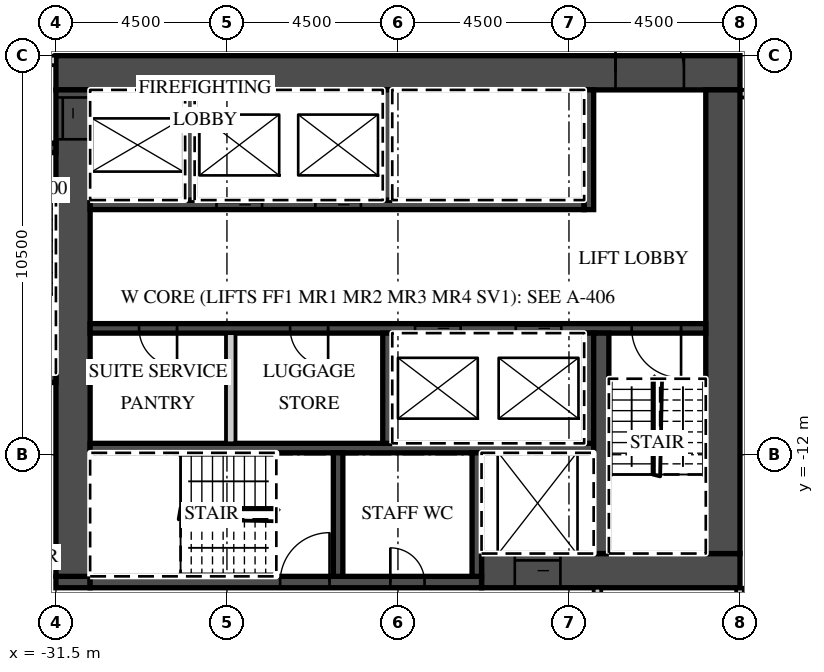
"""IFC4 building model, lengths in metres.
Left out: names, types, materials, properties, quantities, classifications, styles, units other than length and angle.
Written with IfcOpenShell. Run it as: python <this file> out.ifc"""

import sys

from ifc_helpers import new_model, si_unit, direction, frame, frame_2d, origin, place, context, subcontext, project, spatial, rectangle, extrude, element, fill, save


model = new_model("IFC4")
c1 = context("Model", 3, precision=1e-05, world=origin(), true_north=direction((0.0, 1.0)))
c2 = subcontext(c1, "Body", "Model", "MODEL_VIEW")
j1 = project(units=[si_unit("LENGTHUNIT", "METRE"), si_unit("PLANEANGLEUNIT", "RADIAN")], contexts=[c1])
p1 = place(None, origin())
s1 = spatial("IfcSite", under=j1, at=p1, CompositionType="ELEMENT")
p2 = place(p1, origin())
s2 = spatial("IfcBuilding", under=s1, at=p2, CompositionType="ELEMENT")
p3 = place(p2, frame((0.0, 0.0, 173.5)))
s3 = spatial("IfcBuildingStorey", under=s2, at=p3, CompositionType="ELEMENT", Elevation=173.5)
p4 = place(p3, frame((-13.5, -22.3, 0.0), z_axis=(0.0, 0.0, 1.0), x_axis=(0.0, 1.0, 0.0)))
e1 = element("IfcWall", 1, at=p4, inside=s3, PredefinedType="PARTITIONING", context=c2, shape_type="SweptSolid", body=[
    extrude(rectangle(XDim=6.8, YDim=0.2, at=frame_2d((3.4, 0.0))), origin(), (0.0, 0.0, 1.0), 3.02),
])
p5 = place(p3, frame((-13.5, -2.5, 0.0), z_axis=(0.0, 0.0, 1.0), x_axis=(1.0, 0.0, 0.0)))
e2 = element("IfcWall", 2, at=p5, inside=s3, PredefinedType="PARTITIONING", context=c2, shape_type="SweptSolid", body=[
    extrude(rectangle(XDim=27.0, YDim=0.2, at=frame_2d((13.5, 0.0))), origin(), (0.0, 0.0, 1.0), 3.02),
])
p6 = place(p5, frame((0.575, 0.0, 0.0)))
e3 = element("IfcOpeningElement", 3, at=p6, cuts=e2, PredefinedType="OPENING", context=c2, shape_type="SweptSolid", body=[
    extrude(rectangle(XDim=1.0, YDim=2.1, at=frame_2d((0.5, 1.05))), frame((0.0, 0.11, 0.0), z_axis=(0.0, -1.0, 0.0), x_axis=(1.0, 0.0, 0.0)), (0.0, 0.0, 1.0), 0.22),
])
p7 = place(p5, frame((9.863, 0.0, 0.0)))
e4 = element("IfcOpeningElement", 4, at=p7, cuts=e2, PredefinedType="OPENING", context=c2, shape_type="SweptSolid", body=[
    extrude(rectangle(XDim=1.2, YDim=2.1, at=frame_2d((0.6, 1.05))), frame((0.0, 0.11, 0.0), z_axis=(0.0, -1.0, 0.0), x_axis=(1.0, 0.0, 0.0)), (0.0, 0.0, 1.0), 0.22),
])
p8 = place(p5, frame((15.938, 0.0, 0.0)))
e5 = element("IfcOpeningElement", 5, at=p8, cuts=e2, PredefinedType="OPENING", context=c2, shape_type="SweptSolid", body=[
    extrude(rectangle(XDim=1.2, YDim=2.1, at=frame_2d((0.6, 1.05))), frame((0.0, 0.11, 0.0), z_axis=(0.0, -1.0, 0.0), x_axis=(1.0, 0.0, 0.0)), (0.0, 0.0, 1.0), 0.22),
])
p9 = place(p5, frame((23.075, 0.0, 0.0)))
e6 = element("IfcOpeningElement", 6, at=p9, cuts=e2, PredefinedType="OPENING", context=c2, shape_type="SweptSolid", body=[
    extrude(rectangle(XDim=1.0, YDim=2.1, at=frame_2d((0.5, 1.05))), frame((0.0, 0.11, 0.0), z_axis=(0.0, -1.0, 0.0), x_axis=(1.0, 0.0, 0.0)), (0.0, 0.0, 1.0), 0.22),
])
p10 = place(p3, frame((-31.5, -1.95, 0.0), z_axis=(0.0, 0.0, 1.0), x_axis=(1.0, 0.0, 0.0)))
e7 = element("IfcWall", 7, at=p10, inside=s3, PredefinedType="SHEAR", context=c2, shape_type="SweptSolid", body=[
    extrude(rectangle(XDim=18.0, YDim=0.9, at=frame_2d((9.0, 0.0))), origin(), (0.0, 0.0, 1.0), 3.02),
])
p11 = place(p10, frame((14.725, 0.0, 0.0)))
e8 = element("IfcOpeningElement", 8, at=p11, cuts=e7, PredefinedType="OPENING", context=c2, shape_type="SweptSolid", body=[
    extrude(rectangle(XDim=1.8, YDim=2.1, at=frame_2d((0.9, 1.05))), frame((0.0, 0.46, 0.0), z_axis=(0.0, -1.0, 0.0), x_axis=(1.0, 0.0, 0.0)), (0.0, 0.0, 1.0), 0.92),
])
p12 = place(p3, frame((-20.3, -15.05, 0.0), z_axis=(0.0, 0.0, 1.0), x_axis=(1.0, 0.0, 0.0)))
e9 = element("IfcWall", 9, at=p12, inside=s3, PredefinedType="SHEAR", context=c2, shape_type="SweptSolid", body=[
    extrude(rectangle(XDim=6.8, YDim=0.9, at=frame_2d((3.4, 0.0))), origin(), (0.0, 0.0, 1.0), 3.02),
])
p13 = place(p12, frame((0.875, 0.0, 0.0)))
e10 = element("IfcOpeningElement", 10, at=p13, cuts=e9, PredefinedType="OPENING", context=c2, shape_type="SweptSolid", body=[
    extrude(rectangle(XDim=1.2, YDim=2.1, at=frame_2d((0.6, 1.05))), frame((0.0, 0.46, 0.0), z_axis=(0.0, -1.0, 0.0), x_axis=(1.0, 0.0, 0.0)), (0.0, 0.0, 1.0), 0.92),
])
p14 = place(p3, frame((-31.5, -15.35, 0.0), z_axis=(0.0, 0.0, 1.0), x_axis=(1.0, 0.0, 0.0)))
e11 = element("IfcWall", 11, at=p14, inside=s3, PredefinedType="SHEAR", context=c2, shape_type="SweptSolid", body=[
    extrude(rectangle(XDim=0.9, YDim=0.3, at=frame_2d((0.45, 0.0))), origin(), (0.0, 0.0, 1.0), 3.02),
])
p15 = place(p3, frame((-30.6, -15.35, 0.0), z_axis=(0.0, 0.0, 1.0), x_axis=(1.0, 0.0, 0.0)))
e12 = element("IfcWall", 12, at=p15, inside=s3, PredefinedType="SHEAR", context=c2, shape_type="SweptSolid", body=[
    extrude(rectangle(XDim=10.3, YDim=0.3, at=frame_2d((5.15, 0.0))), origin(), (0.0, 0.0, 1.0), 3.02),
])
p16 = place(p15, frame((5.0, 0.0, 0.0)))
e13 = element("IfcOpeningElement", 13, at=p16, cuts=e12, PredefinedType="OPENING", context=c2, shape_type="SweptSolid", body=[
    extrude(rectangle(XDim=1.3, YDim=2.1, at=frame_2d((0.65, 1.05))), frame((0.0, 0.16, 0.0), z_axis=(0.0, -1.0, 0.0), x_axis=(1.0, 0.0, 0.0)), (0.0, 0.0, 1.0), 0.32),
])
p17 = place(p15, frame((7.9, 0.0, 0.0)))
e14 = element("IfcOpeningElement", 14, at=p17, cuts=e12, PredefinedType="OPENING", context=c2, shape_type="SweptSolid", body=[
    extrude(rectangle(XDim=0.9, YDim=2.1, at=frame_2d((0.45, 1.05))), frame((0.0, 0.16, 0.0), z_axis=(0.0, -1.0, 0.0), x_axis=(1.0, 0.0, 0.0)), (0.0, 0.0, 1.0), 0.32),
])
p18 = place(p3, frame((-31.05, -15.2, 0.0), z_axis=(0.0, 0.0, 1.0), x_axis=(0.0, 1.0, 0.0)))
e15 = element("IfcWall", 15, at=p18, inside=s3, PredefinedType="SHEAR", context=c2, shape_type="SweptSolid", body=[
    extrude(rectangle(XDim=12.8, YDim=0.9, at=frame_2d((6.4, 0.0))), origin(), (0.0, 0.0, 1.0), 3.02),
])
p19 = place(p18, frame((11.5, 0.0, 0.0)))
e16 = element("IfcOpeningElement", 16, at=p19, cuts=e15, PredefinedType="OPENING", context=c2, shape_type="SweptSolid", body=[
    extrude(rectangle(XDim=1.1, YDim=2.1, at=frame_2d((0.55, 1.05))), frame((0.0, 0.46, 0.0), z_axis=(0.0, -1.0, 0.0), x_axis=(1.0, 0.0, 0.0)), (0.0, 0.0, 1.0), 0.92),
])
p20 = place(p3, frame((-13.95, -14.6, 0.0), z_axis=(0.0, 0.0, 1.0), x_axis=(0.0, 1.0, 0.0)))
e17 = element("IfcWall", 17, at=p20, inside=s3, PredefinedType="SHEAR", context=c2, shape_type="SweptSolid", body=[
    extrude(rectangle(XDim=12.2, YDim=0.9, at=frame_2d((6.1, 0.0))), origin(), (0.0, 0.0, 1.0), 3.02),
])
p21 = place(p3, frame((-30.6, -5.425, 0.0), z_axis=(0.0, 0.0, 1.0), x_axis=(1.0, 0.0, 0.0)))
e18 = element("IfcWall", 18, at=p21, inside=s3, PredefinedType="SHEAR", context=c2, shape_type="SweptSolid", body=[
    extrude(rectangle(XDim=13.0, YDim=0.25, at=frame_2d((6.5, 0.0))), origin(), (0.0, 0.0, 1.0), 3.02),
])
p22 = place(p21, frame((3.325, 0.0, 0.0)))
e19 = element("IfcOpeningElement", 19, at=p22, cuts=e18, PredefinedType="OPENING", context=c2, shape_type="SweptSolid", body=[
    extrude(rectangle(XDim=1.2, YDim=2.1, at=frame_2d((0.6, 1.05))), frame((0.0, 0.135, 0.0), z_axis=(0.0, -1.0, 0.0), x_axis=(1.0, 0.0, 0.0)), (0.0, 0.0, 1.0), 0.27),
])
p23 = place(p21, frame((5.925, 0.0, 0.0)))
e20 = element("IfcOpeningElement", 20, at=p23, cuts=e18, PredefinedType="OPENING", context=c2, shape_type="SweptSolid", body=[
    extrude(rectangle(XDim=1.2, YDim=2.1, at=frame_2d((0.6, 1.05))), frame((0.0, 0.135, 0.0), z_axis=(0.0, -1.0, 0.0), x_axis=(1.0, 0.0, 0.0)), (0.0, 0.0, 1.0), 0.27),
])
p24 = place(p3, frame((-17.475, -5.55, 0.0), z_axis=(0.0, 0.0, 1.0), x_axis=(0.0, 1.0, 0.0)))
e21 = element("IfcWall", 21, at=p24, inside=s3, PredefinedType="SHEAR", context=c2, shape_type="SweptSolid", body=[
    extrude(rectangle(XDim=3.15, YDim=0.25, at=frame_2d((1.575, 0.0))), origin(), (0.0, 0.0, 1.0), 3.02),
])
for number, where, z_axis, x_axis in (
    (22, (-27.975, -5.3, 0.0), (0.0, 0.0, 1.0), (0.0, 1.0, 0.0)),
    (23, (-22.775, -5.3, 0.0), (0.0, 0.0, 1.0), (0.0, 1.0, 0.0)),
):
    element("IfcWall", number, at=place(p3, frame(where, z_axis=z_axis, x_axis=x_axis)), inside=s3, PredefinedType="SHEAR", context=c2, shape_type="SweptSolid", body=[
        extrude(rectangle(XDim=2.9, YDim=0.25, at=frame_2d((1.45, 0.0))), origin(), (0.0, 0.0, 1.0), 3.02),
    ])
p25 = place(p3, frame((-30.6, -8.675, 0.0), z_axis=(0.0, 0.0, 1.0), x_axis=(1.0, 0.0, 0.0)))
e24 = element("IfcWall", 24, at=p25, inside=s3, PredefinedType="SHEAR", context=c2, shape_type="SweptSolid", body=[
    extrude(rectangle(XDim=16.2, YDim=0.25, at=frame_2d((8.1, 0.0))), origin(), (0.0, 0.0, 1.0), 3.02),
])
p26 = place(p25, frame((8.55, 0.0, 0.0)))
e25 = element("IfcOpeningElement", 25, at=p26, cuts=e24, PredefinedType="OPENING", context=c2, shape_type="SweptSolid", body=[
    extrude(rectangle(XDim=1.2, YDim=2.1, at=frame_2d((0.6, 1.05))), frame((0.0, 0.135, 0.0), z_axis=(0.0, -1.0, 0.0), x_axis=(1.0, 0.0, 0.0)), (0.0, 0.0, 1.0), 0.27),
])
p27 = place(p25, frame((11.2, 0.0, 0.0)))
e26 = element("IfcOpeningElement", 26, at=p27, cuts=e24, PredefinedType="OPENING", context=c2, shape_type="SweptSolid", body=[
    extrude(rectangle(XDim=1.2, YDim=2.1, at=frame_2d((0.6, 1.05))), frame((0.0, 0.135, 0.0), z_axis=(0.0, -1.0, 0.0), x_axis=(1.0, 0.0, 0.0)), (0.0, 0.0, 1.0), 0.27),
])
p28 = place(p25, frame((14.25, 0.0, 0.0)))
e27 = element("IfcOpeningElement", 27, at=p28, cuts=e24, PredefinedType="OPENING", context=c2, shape_type="SweptSolid", body=[
    extrude(rectangle(XDim=1.3, YDim=2.1, at=frame_2d((0.65, 1.05))), frame((0.0, 0.135, 0.0), z_axis=(0.0, -1.0, 0.0), x_axis=(1.0, 0.0, 0.0)), (0.0, 0.0, 1.0), 0.27),
])
p29 = place(p25, frame((1.288, 0.0, 0.0)))
e28 = element("IfcOpeningElement", 28, at=p29, cuts=e24, PredefinedType="OPENING", context=c2, shape_type="SweptSolid", body=[
    extrude(rectangle(XDim=1.0, YDim=2.1, at=frame_2d((0.5, 1.05))), frame((0.0, 0.135, 0.0), z_axis=(0.0, -1.0, 0.0), x_axis=(1.0, 0.0, 0.0)), (0.0, 0.0, 1.0), 0.27),
])
p30 = place(p25, frame((5.262, 0.0, 0.0)))
e29 = element("IfcOpeningElement", 29, at=p30, cuts=e24, PredefinedType="OPENING", context=c2, shape_type="SweptSolid", body=[
    extrude(rectangle(XDim=1.0, YDim=2.1, at=frame_2d((0.5, 1.05))), frame((0.0, 0.135, 0.0), z_axis=(0.0, -1.0, 0.0), x_axis=(1.0, 0.0, 0.0)), (0.0, 0.0, 1.0), 0.27),
])
p31 = place(p3, frame((-30.6, -11.825, 0.0), z_axis=(0.0, 0.0, 1.0), x_axis=(1.0, 0.0, 0.0)))
e30 = element("IfcWall", 30, at=p31, inside=s3, PredefinedType="SHEAR", context=c2, shape_type="SweptSolid", body=[
    extrude(rectangle(XDim=13.25, YDim=0.25, at=frame_2d((6.625, 0.0))), origin(), (0.0, 0.0, 1.0), 3.02),
])
for number, where, z_axis, x_axis in (
    (31, (-17.475, -11.7, 0.0), (0.0, 0.0, 1.0), (0.0, 1.0, 0.0)),
    (32, (-22.775, -11.7, 0.0), (0.0, 0.0, 1.0), (0.0, 1.0, 0.0)),
):
    element("IfcWall", number, at=place(p3, frame(where, z_axis=z_axis, x_axis=x_axis)), inside=s3, PredefinedType="SHEAR", context=c2, shape_type="SweptSolid", body=[
        extrude(rectangle(XDim=2.9, YDim=0.25, at=frame_2d((1.45, 0.0))), origin(), (0.0, 0.0, 1.0), 3.02),
    ])
p32 = place(p3, frame((-26.9, -11.7, 0.0), z_axis=(0.0, 0.0, 1.0), x_axis=(0.0, 1.0, 0.0)))
e33 = element("IfcWall", 33, at=p32, inside=s3, PredefinedType="PARTITIONING", context=c2, shape_type="SweptSolid", body=[
    extrude(rectangle(XDim=2.9, YDim=0.25, at=frame_2d((1.45, 0.0))), origin(), (0.0, 0.0, 1.0), 3.02),
])
p33 = place(p3, frame((-17.15, -14.6, 0.0), z_axis=(0.0, 0.0, 1.0), x_axis=(0.0, 1.0, 0.0)))
e34 = element("IfcWall", 34, at=p33, inside=s3, PredefinedType="SHEAR", context=c2, shape_type="SweptSolid", body=[
    extrude(rectangle(XDim=5.8, YDim=0.4, at=frame_2d((2.9, 0.0))), origin(), (0.0, 0.0, 1.0), 3.02),
])
for number, where, z_axis, x_axis in (
    (35, (-20.425, -15.2, 0.0), (0.0, 0.0, 1.0), (0.0, 1.0, 0.0)),
    (36, (-24.075, -15.2, 0.0), (0.0, 0.0, 1.0), (0.0, 1.0, 0.0)),
):
    element("IfcWall", number, at=place(p3, frame(where, z_axis=z_axis, x_axis=x_axis)), inside=s3, PredefinedType="SHEAR", context=c2, shape_type="SweptSolid", body=[
        extrude(rectangle(XDim=3.25, YDim=0.25, at=frame_2d((1.625, 0.0))), origin(), (0.0, 0.0, 1.0), 3.02),
    ])
p34 = place(p3, frame((-42.632, -1.625, 0.0), z_axis=(0.0, 0.0, 1.0), x_axis=(1.0, 0.0, 0.0)))
e37 = element("IfcWall", 37, at=p34, inside=s3, PredefinedType="PARTITIONING", context=c2, shape_type="SweptSolid", body=[
    extrude(rectangle(XDim=11.132, YDim=0.25, at=frame_2d((5.566, 0.0))), origin(), (0.0, 0.0, 1.0), 3.02),
])
p35 = place(p34, frame((9.207, 0.0, 0.0)))
e38 = element("IfcOpeningElement", 38, at=p35, cuts=e37, PredefinedType="OPENING", context=c2, shape_type="SweptSolid", body=[
    extrude(rectangle(XDim=1.3, YDim=2.1, at=frame_2d((0.65, 1.05))), frame((0.0, 0.135, 0.0), z_axis=(0.0, -1.0, 0.0), x_axis=(1.0, 0.0, 0.0)), (0.0, 0.0, 1.0), 0.27),
])
p36 = place(p34, frame((6.781, 0.0, 0.0)))
e39 = element("IfcOpeningElement", 39, at=p36, cuts=e37, PredefinedType="OPENING", context=c2, shape_type="SweptSolid", body=[
    extrude(rectangle(XDim=1.1, YDim=2.1, at=frame_2d((0.55, 1.05))), frame((0.0, 0.135, 0.0), z_axis=(0.0, -1.0, 0.0), x_axis=(1.0, 0.0, 0.0)), (0.0, 0.0, 1.0), 0.27),
])
p37 = place(p3, frame((-34.05, -3.925, 0.0), z_axis=(0.0, 0.0, 1.0), x_axis=(1.0, 0.0, 0.0)))
e40 = element("IfcWall", 40, at=p37, inside=s3, PredefinedType="SHEAR", context=c2, shape_type="SweptSolid", body=[
    extrude(rectangle(XDim=2.55, YDim=0.25, at=frame_2d((1.275, 0.0))), origin(), (0.0, 0.0, 1.0), 3.02),
])
p38 = place(p37, frame((0.625, 0.0, 0.0)))
e41 = element("IfcOpeningElement", 41, at=p38, cuts=e40, PredefinedType="OPENING", context=c2, shape_type="SweptSolid", body=[
    extrude(rectangle(XDim=1.3, YDim=2.1, at=frame_2d((0.65, 1.05))), frame((0.0, 0.135, 0.0), z_axis=(0.0, -1.0, 0.0), x_axis=(1.0, 0.0, 0.0)), (0.0, 0.0, 1.0), 0.27),
])
p39 = place(p3, frame((-34.05, -9.975, 0.0), z_axis=(0.0, 0.0, 1.0), x_axis=(1.0, 0.0, 0.0)))
e42 = element("IfcWall", 42, at=p39, inside=s3, PredefinedType="SHEAR", context=c2, shape_type="SweptSolid", body=[
    extrude(rectangle(XDim=2.55, YDim=0.25, at=frame_2d((1.275, 0.0))), origin(), (0.0, 0.0, 1.0), 3.02),
])
p40 = place(p3, frame((-17.25, -17.7, 0.0), z_axis=(0.0, 0.0, 1.0), x_axis=(0.0, 1.0, 0.0)))
e43 = element("IfcWall", 43, at=p40, inside=s3, PredefinedType="PARTITIONING", context=c2, shape_type="SweptSolid", body=[
    extrude(rectangle(XDim=2.2, YDim=0.2, at=frame_2d((1.1, 0.0))), origin(), (0.0, 0.0, 1.0), 3.02),
])
p41 = place(p26, origin())
e44 = element("IfcDoor", 44, at=p41, inside=s3, OperationType="SLIDING_TO_LEFT", PredefinedType="DOOR", context=c2, shape_type="SweptSolid", body=[
    extrude(rectangle(XDim=1.2, YDim=2.1, at=frame_2d((0.6, 1.05))), frame((0.0, 0.025, 0.0), z_axis=(0.0, -1.0, 0.0), x_axis=(1.0, 0.0, 0.0)), (0.0, 0.0, 1.0), 0.05),
])
fill(e25, e44)
p42 = place(p27, origin())
e45 = element("IfcDoor", 45, at=p42, inside=s3, OperationType="SLIDING_TO_RIGHT", PredefinedType="DOOR", context=c2, shape_type="SweptSolid", body=[
    extrude(rectangle(XDim=1.2, YDim=2.1, at=frame_2d((0.6, 1.05))), frame((0.0, 0.025, 0.0), z_axis=(0.0, -1.0, 0.0), x_axis=(1.0, 0.0, 0.0)), (0.0, 0.0, 1.0), 0.05),
])
fill(e26, e45)
p43 = place(p22, origin())
e46 = element("IfcDoor", 46, at=p43, inside=s3, OperationType="SLIDING_TO_RIGHT", PredefinedType="DOOR", context=c2, shape_type="SweptSolid", body=[
    extrude(rectangle(XDim=1.2, YDim=2.1, at=frame_2d((0.6, 1.05))), frame((0.0, 0.025, 0.0), z_axis=(0.0, -1.0, 0.0), x_axis=(1.0, 0.0, 0.0)), (0.0, 0.0, 1.0), 0.05),
])
fill(e19, e46)
p44 = place(p23, origin())
e47 = element("IfcDoor", 47, at=p44, inside=s3, OperationType="SLIDING_TO_RIGHT", PredefinedType="DOOR", context=c2, shape_type="SweptSolid", body=[
    extrude(rectangle(XDim=1.2, YDim=2.1, at=frame_2d((0.6, 1.05))), frame((0.0, 0.025, 0.0), z_axis=(0.0, -1.0, 0.0), x_axis=(1.0, 0.0, 0.0)), (0.0, 0.0, 1.0), 0.05),
])
fill(e20, e47)
p45 = place(p13, origin())
e48 = element("IfcDoor", 48, at=p45, inside=s3, OperationType="SLIDING_TO_LEFT", PredefinedType="DOOR", context=c2, shape_type="SweptSolid", body=[
    extrude(rectangle(XDim=1.2, YDim=2.1, at=frame_2d((0.6, 1.05))), frame((0.0, 0.025, 0.0), z_axis=(0.0, -1.0, 0.0), x_axis=(1.0, 0.0, 0.0)), (0.0, 0.0, 1.0), 0.05),
])
fill(e10, e48)
p46 = place(p19, origin())
e49 = element("IfcDoor", 49, at=p46, inside=s3, OperationType="SLIDING_TO_RIGHT", PredefinedType="DOOR", context=c2, shape_type="SweptSolid", body=[
    extrude(rectangle(XDim=1.1, YDim=2.1, at=frame_2d((0.55, 1.05))), frame((0.0, 0.025, 0.0), z_axis=(0.0, -1.0, 0.0), x_axis=(1.0, 0.0, 0.0)), (0.0, 0.0, 1.0), 0.05),
])
fill(e16, e49)
p47 = place(p11, origin())
e50 = element("IfcDoor", 50, at=p47, inside=s3, OperationType="DOUBLE_DOOR_DOUBLE_SWING", PredefinedType="DOOR", context=c2, shape_type="SweptSolid", body=[
    extrude(rectangle(XDim=1.8, YDim=2.1, at=frame_2d((0.9, 1.05))), frame((0.0, 0.025, 0.0), z_axis=(0.0, -1.0, 0.0), x_axis=(1.0, 0.0, 0.0)), (0.0, 0.0, 1.0), 0.05),
])
fill(e8, e50)
p48 = place(p28, origin())
e51 = element("IfcDoor", 51, at=p48, inside=s3, OperationType="SINGLE_SWING_RIGHT", PredefinedType="DOOR", context=c2, shape_type="SweptSolid", body=[
    extrude(rectangle(XDim=1.3, YDim=2.1, at=frame_2d((0.65, 1.05))), frame((0.0, 0.025, 0.0), z_axis=(0.0, -1.0, 0.0), x_axis=(1.0, 0.0, 0.0)), (0.0, 0.0, 1.0), 0.05),
])
fill(e27, e51)
p49 = place(p16, origin())
e52 = element("IfcDoor", 52, at=p49, inside=s3, OperationType="SINGLE_SWING_RIGHT", PredefinedType="DOOR", context=c2, shape_type="SweptSolid", body=[
    extrude(rectangle(XDim=1.3, YDim=2.1, at=frame_2d((0.65, 1.05))), frame((0.0, 0.025, 0.0), z_axis=(0.0, -1.0, 0.0), x_axis=(1.0, 0.0, 0.0)), (0.0, 0.0, 1.0), 0.05),
])
fill(e13, e52)
p50 = place(p17, origin())
e53 = element("IfcDoor", 53, at=p50, inside=s3, OperationType="SINGLE_SWING_LEFT", PredefinedType="DOOR", context=c2, shape_type="SweptSolid", body=[
    extrude(rectangle(XDim=0.9, YDim=2.1, at=frame_2d((0.45, 1.05))), frame((0.0, 0.025, 0.0), z_axis=(0.0, -1.0, 0.0), x_axis=(1.0, 0.0, 0.0)), (0.0, 0.0, 1.0), 0.05),
])
fill(e14, e53)
p51 = place(p29, origin())
e54 = element("IfcDoor", 54, at=p51, inside=s3, OperationType="SINGLE_SWING_RIGHT", PredefinedType="DOOR", context=c2, shape_type="SweptSolid", body=[
    extrude(rectangle(XDim=1.0, YDim=2.1, at=frame_2d((0.5, 1.05))), frame((0.0, 0.025, 0.0), z_axis=(0.0, -1.0, 0.0), x_axis=(1.0, 0.0, 0.0)), (0.0, 0.0, 1.0), 0.05),
])
fill(e28, e54)
p52 = place(p30, origin())
e55 = element("IfcDoor", 55, at=p52, inside=s3, OperationType="SINGLE_SWING_RIGHT", PredefinedType="DOOR", context=c2, shape_type="SweptSolid", body=[
    extrude(rectangle(XDim=1.0, YDim=2.1, at=frame_2d((0.5, 1.05))), frame((0.0, 0.025, 0.0), z_axis=(0.0, -1.0, 0.0), x_axis=(1.0, 0.0, 0.0)), (0.0, 0.0, 1.0), 0.05),
])
fill(e29, e55)
save(model, sys.argv[1])
